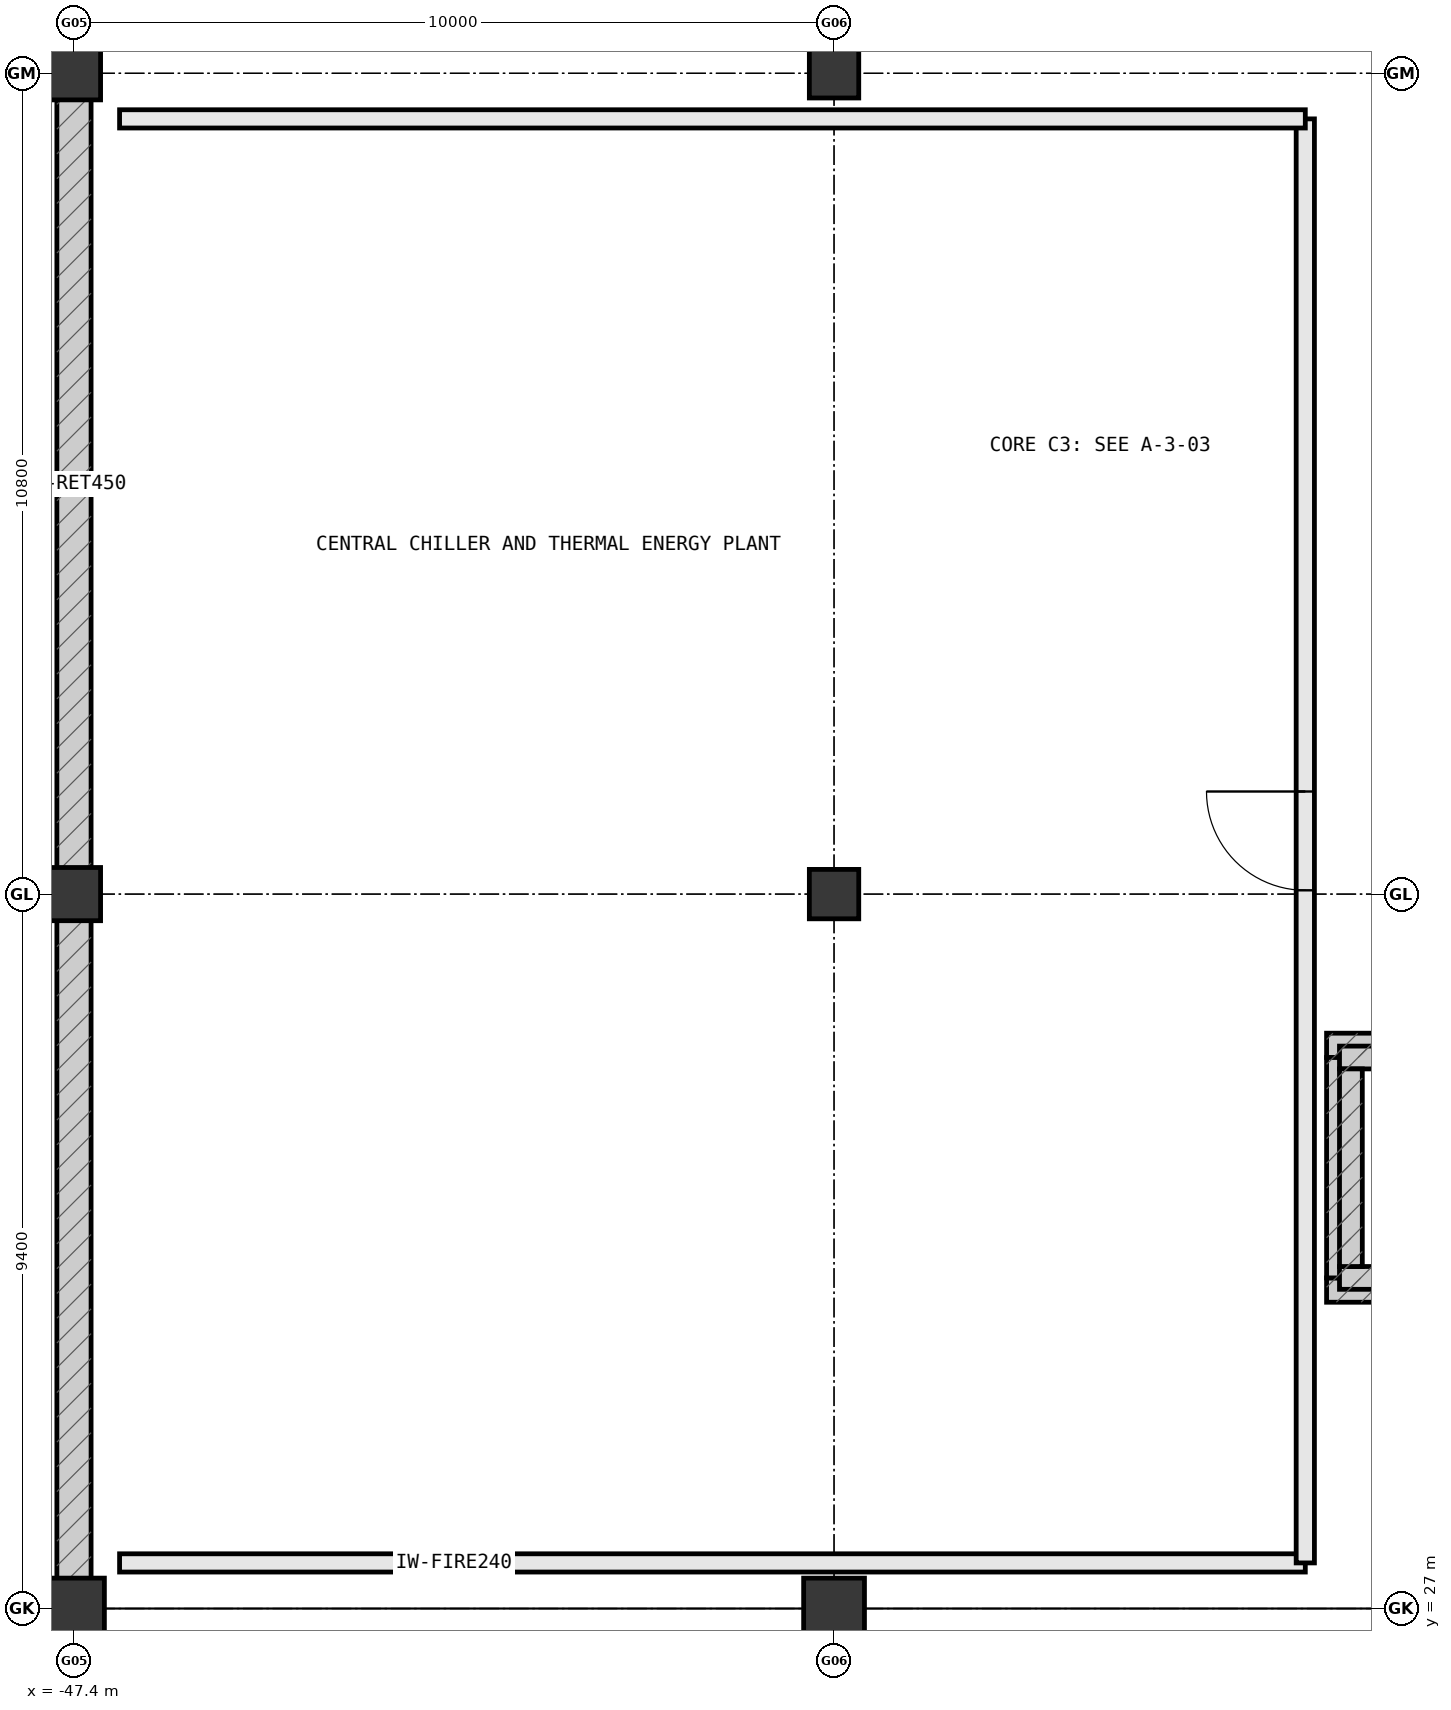
"""IFC4 building model, lengths in metres.
Left out: names, types, materials, properties, quantities, classifications, styles, units other than length and angle.
Written with IfcOpenShell. Run it as: python <this file> out.ifc"""

import sys

from ifc_helpers import new_model, si_unit, direction, frame, frame_2d, origin, origin_2d, place, context, subcontext, project, spatial, rectangle, extrude, element, fill, save


model = new_model("IFC4")
c1 = context("Model", 3, precision=1e-05, world=origin(), true_north=direction((0.0, 1.0)))
c2 = subcontext(c1, "Body", "Model", "MODEL_VIEW")
j1 = project(units=[si_unit("LENGTHUNIT", "METRE"), si_unit("PLANEANGLEUNIT", "RADIAN")], contexts=[c1])
p1 = place(None, origin())
s1 = spatial("IfcSite", under=j1, at=p1, CompositionType="ELEMENT")
p2 = place(p1, origin())
s2 = spatial("IfcBuilding", under=s1, at=p2, CompositionType="ELEMENT")
p3 = place(p2, frame((0.0, 0.0, -4.5)))
s3 = spatial("IfcBuildingStorey", under=s2, at=p3, CompositionType="ELEMENT", Elevation=-4.5)
for number, where, z_axis, x_axis in (
    (1, (-47.4, 27.0, 0.0), (0.0, 0.0, 1.0), (1.0, 0.0, 0.0)),
    (2, (-37.4, 27.0, 0.0), (0.0, 0.0, 1.0), (1.0, 0.0, 0.0)),
):
    element("IfcColumn", number, at=place(p3, frame(where, z_axis=z_axis, x_axis=x_axis)), inside=s3, PredefinedType="COLUMN", context=c2, shape_type="SweptSolid", body=[
        extrude(rectangle(XDim=0.8, YDim=0.8, at=origin_2d()), origin(), (0.0, 0.0, 1.0), 4.5),
    ])
for number, where, z_axis, x_axis in (
    (3, (-47.4, 36.4, 0.0), (0.0, 0.0, 1.0), (1.0, 0.0, 0.0)),
    (4, (-47.4, 47.2, 0.0), (0.0, 0.0, 1.0), (1.0, 0.0, 0.0)),
):
    element("IfcColumn", number, at=place(p3, frame(where, z_axis=z_axis, x_axis=x_axis)), inside=s3, PredefinedType="COLUMN", context=c2, shape_type="SweptSolid", body=[
        extrude(rectangle(XDim=0.7, YDim=0.7, at=origin_2d()), origin(), (0.0, 0.0, 1.0), 4.5),
    ])
for number, where, z_axis, x_axis in (
    (5, (-37.4, 36.4, 0.0), (0.0, 0.0, 1.0), (1.0, 0.0, 0.0)),
    (6, (-37.4, 47.2, 0.0), (0.0, 0.0, 1.0), (1.0, 0.0, 0.0)),
):
    element("IfcColumn", number, at=place(p3, frame(where, z_axis=z_axis, x_axis=x_axis)), inside=s3, PredefinedType="COLUMN", context=c2, shape_type="SweptSolid", body=[
        extrude(rectangle(XDim=0.65, YDim=0.65, at=origin_2d()), origin(), (0.0, 0.0, 1.0), 4.5),
    ])
for number, where, z_axis, x_axis in (
    (7, (-30.92, 31.19, -1.18), (0.0, 0.0, 1.0), (1.0, 0.0, 0.0)),
    (8, (-24.63, 34.41, -1.18), (0.0, 0.0, 1.0), (-1.0, 0.0, 0.0)),
):
    element("IfcWall", number, at=place(p3, frame(where, z_axis=z_axis, x_axis=x_axis)), inside=s3, PredefinedType="SHEAR", context=c2, shape_type="SweptSolid", body=[
        extrude(rectangle(XDim=6.29, YDim=0.32, at=frame_2d((3.145, 0.0))), origin(), (0.0, 0.0, 1.0), 1.18),
    ])
p4 = place(p3, frame((-30.76, 34.25, -1.18), z_axis=(0.0, 0.0, 1.0), x_axis=(0.0, -1.0, 0.0)))
e9 = element("IfcWall", 9, at=p4, inside=s3, PredefinedType="SHEAR", context=c2, shape_type="SweptSolid", body=[
    extrude(rectangle(XDim=2.9, YDim=0.32, at=frame_2d((1.45, 0.0))), origin(), (0.0, 0.0, 1.0), 1.18),
])
p5 = place(p3, frame((-47.4, 58.0, 0.0), z_axis=(0.0, 0.0, 1.0), x_axis=(0.0, -1.0, 0.0)))
e10 = element("IfcWall", 10, at=p5, inside=s3, PredefinedType="USERDEFINED", context=c2, shape_type="SweptSolid", body=[
    extrude(rectangle(XDim=31.0, YDim=0.45, at=frame_2d((15.5, 0.0))), origin(), (0.0, 0.0, 1.0), 4.2),
])
p6 = place(p3, frame((-47.4, 27.0, 0.0), z_axis=(0.0, 0.0, 1.0), x_axis=(-1.0, 0.0, 0.0)))
e11 = element("IfcWall", 11, at=p6, inside=s3, PredefinedType="USERDEFINED", context=c2, shape_type="SweptSolid", body=[
    extrude(rectangle(XDim=30.8, YDim=0.45, at=frame_2d((15.4, 0.0))), origin(), (0.0, 0.0, 1.0), 4.2),
])
p7 = place(p3, frame((-30.75, 31.35, 0.0), z_axis=(0.0, 0.0, 1.0), x_axis=(1.0, 0.0, 0.0)))
e12 = element("IfcWall", 12, at=p7, inside=s3, PredefinedType="SHEAR", context=c2, shape_type="SweptSolid", body=[
    extrude(rectangle(XDim=3.1, YDim=0.3, at=frame_2d((1.55, 0.0))), origin(), (0.0, 0.0, 1.0), 4.5),
])
p8 = place(p7, frame((0.95, 0.0, 0.0)))
e13 = element("IfcOpeningElement", 13, at=p8, cuts=e12, PredefinedType="OPENING", context=c2, shape_type="SweptSolid", body=[
    extrude(rectangle(XDim=1.2, YDim=2.2, at=frame_2d((0.6, 1.1))), frame((0.0, 0.162, 0.0), z_axis=(0.0, -1.0, 0.0), x_axis=(1.0, 0.0, 0.0)), (0.0, 0.0, 1.0), 0.324),
])
p9 = place(p3, frame((-27.65, 34.25, 0.0), z_axis=(0.0, 0.0, 1.0), x_axis=(-1.0, 0.0, 0.0)))
e14 = element("IfcWall", 14, at=p9, inside=s3, PredefinedType="SHEAR", context=c2, shape_type="SweptSolid", body=[
    extrude(rectangle(XDim=3.1, YDim=0.3, at=frame_2d((1.55, 0.0))), origin(), (0.0, 0.0, 1.0), 4.5),
])
p10 = place(p3, frame((-30.6, 34.1, 0.0), z_axis=(0.0, 0.0, 1.0), x_axis=(0.0, -1.0, 0.0)))
e15 = element("IfcWall", 15, at=p10, inside=s3, PredefinedType="SHEAR", context=c2, shape_type="SweptSolid", body=[
    extrude(rectangle(XDim=2.6, YDim=0.3, at=frame_2d((1.3, 0.0))), origin(), (0.0, 0.0, 1.0), 4.5),
])
p11 = place(p3, frame((-46.8, 27.6, 0.0), z_axis=(0.0, 0.0, 1.0), x_axis=(1.0, 0.0, 0.0)))
e16 = element("IfcWall", 16, at=p11, inside=s3, PredefinedType="STANDARD", context=c2, shape_type="SweptSolid", body=[
    extrude(rectangle(XDim=15.6, YDim=0.24, at=frame_2d((7.8, 0.0))), origin(), (0.0, 0.0, 1.0), 4.2),
])
p12 = place(p3, frame((-31.2, 27.6, 0.0), z_axis=(0.0, 0.0, 1.0), x_axis=(0.0, 1.0, 0.0)))
e17 = element("IfcWall", 17, at=p12, inside=s3, PredefinedType="STANDARD", context=c2, shape_type="SweptSolid", body=[
    extrude(rectangle(XDim=19.0, YDim=0.24, at=frame_2d((9.5, 0.0))), origin(), (0.0, 0.0, 1.0), 3.658),
])
p13 = place(p12, frame((8.85, 0.0, 0.0)))
e18 = element("IfcOpeningElement", 18, at=p13, cuts=e17, PredefinedType="OPENING", context=c2, shape_type="SweptSolid", body=[
    extrude(rectangle(XDim=1.3, YDim=2.2, at=frame_2d((0.65, 1.1))), frame((0.0, 0.132, 0.0), z_axis=(0.0, -1.0, 0.0), x_axis=(1.0, 0.0, 0.0)), (0.0, 0.0, 1.0), 0.264),
])
p14 = place(p3, frame((-31.2, 46.6, 0.0), z_axis=(0.0, 0.0, 1.0), x_axis=(-1.0, 0.0, 0.0)))
e19 = element("IfcWall", 19, at=p14, inside=s3, PredefinedType="STANDARD", context=c2, shape_type="SweptSolid", body=[
    extrude(rectangle(XDim=15.6, YDim=0.24, at=frame_2d((7.8, 0.0))), origin(), (0.0, 0.0, 1.0), 4.2),
])
p15 = place(p13, origin())
e20 = element("IfcDoor", 20, at=p15, inside=s3, OperationType="SINGLE_SWING_RIGHT", PredefinedType="DOOR", context=c2, shape_type="SweptSolid", body=[
    extrude(rectangle(XDim=1.3, YDim=2.2, at=frame_2d((0.65, 1.1))), frame((0.0, 0.025, 0.0), z_axis=(0.0, -1.0, 0.0), x_axis=(1.0, 0.0, 0.0)), (0.0, 0.0, 1.0), 0.05),
])
fill(e18, e20)
save(model, sys.argv[1])
